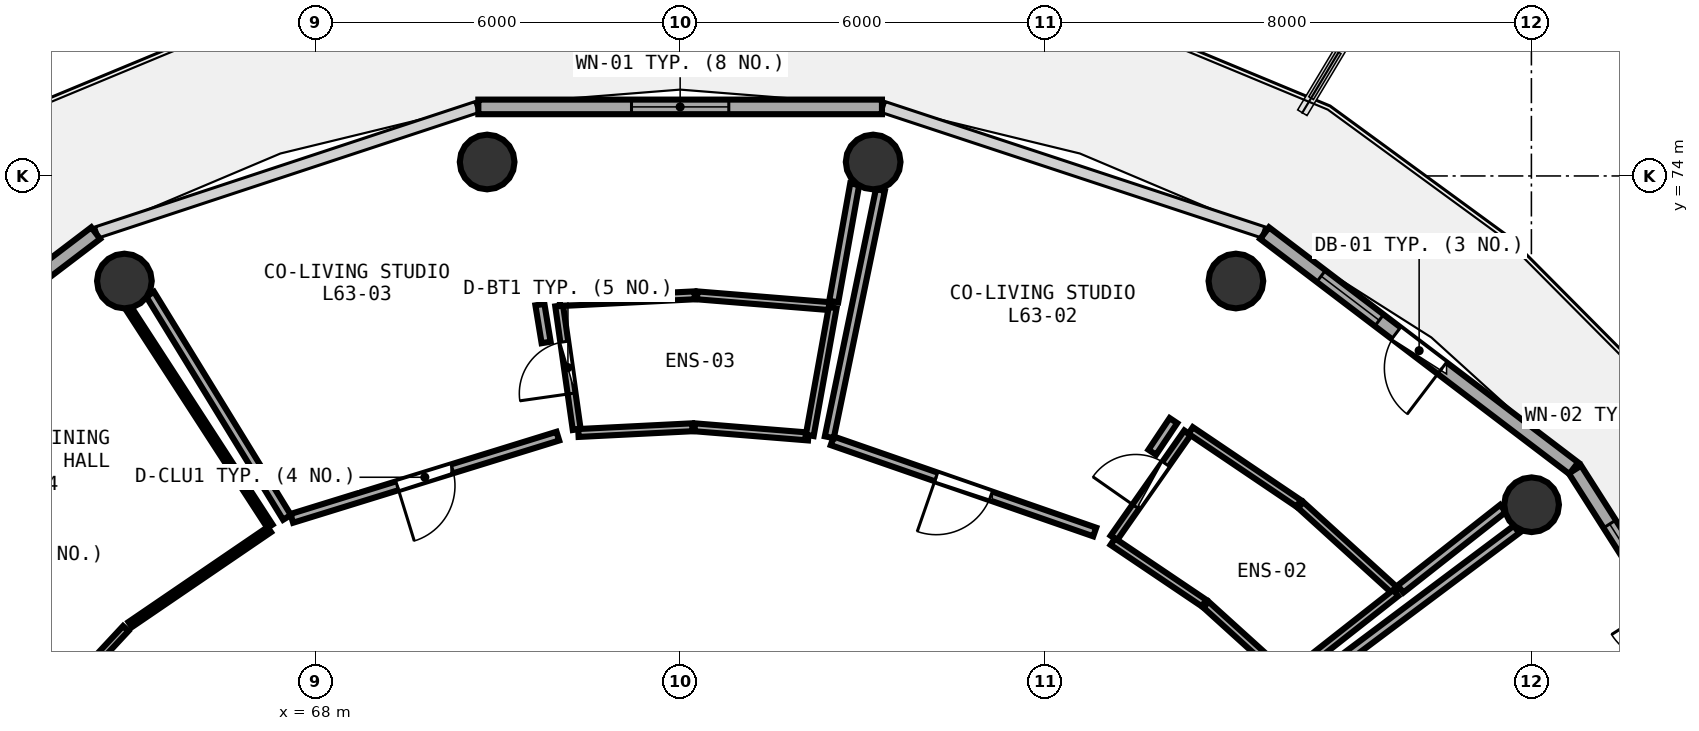
"""IFC4 building model, lengths in metres.
Left out: names, types, materials, properties, quantities, classifications, styles, units other than length and angle.
Written with IfcOpenShell. Run it as: python <this file> out.ifc"""

import sys

from ifc_helpers import new_model, si_unit, direction, frame, frame_2d, origin, origin_2d, place, context, subcontext, project, spatial, rectangle, circle, extrude, element, fill, save


model = new_model("IFC4")
c1 = context("Model", 3, precision=1e-05, world=origin(), true_north=direction((0.0, 1.0)))
c2 = subcontext(c1, "Body", "Model", "MODEL_VIEW")
j1 = project(units=[si_unit("LENGTHUNIT", "METRE"), si_unit("PLANEANGLEUNIT", "RADIAN")], contexts=[c1])
p1 = place(None, origin())
s1 = spatial("IfcSite", under=j1, at=p1, CompositionType="ELEMENT")
p2 = place(p1, origin())
s2 = spatial("IfcBuilding", under=s1, at=p2, CompositionType="ELEMENT")
p3 = place(p2, frame((0.0, 0.0, 248.7)))
s3 = spatial("IfcBuildingStorey", under=s2, at=p3, CompositionType="ELEMENT", Elevation=248.7)
for number, where, z_axis, x_axis in (
    (1, (88.003, 68.593, 0.0), (0.0, 0.0, 1.0), (1.0, 0.0, 0.0)),
    (2, (83.14, 72.272, 0.0), (0.0, 0.0, 1.0), (1.0, 0.0, 0.0)),
    (3, (77.174, 74.229, 0.0), (0.0, 0.0, 1.0), (1.0, 0.0, 0.0)),
    (4, (70.826, 74.229, 0.0), (0.0, 0.0, 1.0), (1.0, 0.0, 0.0)),
    (5, (64.86, 72.272, 0.0), (0.0, 0.0, 1.0), (1.0, 0.0, 0.0)),
):
    element("IfcColumn", number, at=place(p3, frame(where, z_axis=z_axis, x_axis=x_axis)), inside=s3, PredefinedType="COLUMN", context=c2, shape_type="SweptSolid", body=[
        extrude(circle(Radius=0.45, at=origin_2d()), origin(), (0.0, 0.0, 1.0), 3.75),
    ])
p4 = place(p3, frame((92.034, 63.964, 0.0), z_axis=(0.0, 0.0, 1.0), x_axis=(-0.537271968456, 0.843409053728, 0.0)))
e6 = element("IfcWall", 6, at=p4, inside=s3, PredefinedType="SOLIDWALL", context=c2, shape_type="SweptSolid", body=[
    extrude(rectangle(XDim=6.175, YDim=0.24, at=frame_2d((3.087, 0.0))), origin(), (0.0, 0.0, 1.0), 3.475),
])
p5 = place(p4, frame((2.613, 0.0, 0.0)))
e7 = element("IfcOpeningElement", 7, at=p5, cuts=e6, PredefinedType="OPENING", context=c2, shape_type="SweptSolid", body=[
    extrude(rectangle(XDim=0.95, YDim=2.1, at=frame_2d((0.475, 1.05))), frame((0.0, 0.13, 0.0), z_axis=(0.0, -1.0, 0.0), x_axis=(1.0, 0.0, 0.0)), (0.0, 0.0, 1.0), 0.26),
])
p6 = place(p4, frame((3.913, 0.0, 0.85)))
e8 = element("IfcOpeningElement", 8, at=p6, cuts=e6, PredefinedType="OPENING", context=c2, shape_type="SweptSolid", body=[
    extrude(rectangle(XDim=1.2, YDim=1.45, at=frame_2d((0.6, 0.725))), frame((0.0, 0.13, 0.0), z_axis=(0.0, -1.0, 0.0), x_axis=(1.0, 0.0, 0.0)), (0.0, 0.0, 1.0), 0.26),
])
p7 = place(p3, frame((88.696, 69.194, 0.0), z_axis=(0.0, 0.0, 1.0), x_axis=(-0.796010444211, 0.605282886514, 0.0)))
e9 = element("IfcWall", 9, at=p7, inside=s3, PredefinedType="SOLIDWALL", context=c2, shape_type="SweptSolid", body=[
    extrude(rectangle(XDim=6.387, YDim=0.24, at=frame_2d((3.194, 0.0))), origin(), (0.0, 0.0, 1.0), 3.475),
])
p8 = place(p7, frame((2.719, 0.0, 0.0)))
e10 = element("IfcOpeningElement", 10, at=p8, cuts=e9, PredefinedType="OPENING", context=c2, shape_type="SweptSolid", body=[
    extrude(rectangle(XDim=0.95, YDim=2.1, at=frame_2d((0.475, 1.05))), frame((0.0, 0.13, 0.0), z_axis=(0.0, -1.0, 0.0), x_axis=(1.0, 0.0, 0.0)), (0.0, 0.0, 1.0), 0.26),
])
p9 = place(p7, frame((4.019, 0.0, 0.85)))
e11 = element("IfcOpeningElement", 11, at=p9, cuts=e9, PredefinedType="OPENING", context=c2, shape_type="SweptSolid", body=[
    extrude(rectangle(XDim=1.2, YDim=1.45, at=frame_2d((0.6, 0.725))), frame((0.0, 0.13, 0.0), z_axis=(0.0, -1.0, 0.0), x_axis=(1.0, 0.0, 0.0)), (0.0, 0.0, 1.0), 0.26),
])
p10 = place(p3, frame((77.319, 75.136, 0.0), z_axis=(0.0, 0.0, 1.0), x_axis=(-1.0, 0.0, 0.0)))
e12 = element("IfcWall", 12, at=p10, inside=s3, PredefinedType="SOLIDWALL", context=c2, shape_type="SweptSolid", body=[
    extrude(rectangle(XDim=6.638, YDim=0.24, at=frame_2d((3.319, 0.0))), origin(), (0.0, 0.0, 1.0), 3.475),
])
p11 = place(p10, frame((2.519, 0.0, 0.85)))
e13 = element("IfcOpeningElement", 13, at=p11, cuts=e12, PredefinedType="OPENING", context=c2, shape_type="SweptSolid", body=[
    extrude(rectangle(XDim=1.6, YDim=1.45, at=frame_2d((0.8, 0.725))), frame((0.0, 0.13, 0.0), z_axis=(0.0, -1.0, 0.0), x_axis=(1.0, 0.0, 0.0)), (0.0, 0.0, 1.0), 0.26),
])
p12 = place(p3, frame((64.388, 73.06, 0.0), z_axis=(0.0, 0.0, 1.0), x_axis=(-0.796010444211, -0.605282886514, 0.0)))
e14 = element("IfcWall", 14, at=p12, inside=s3, PredefinedType="SOLIDWALL", context=c2, shape_type="SweptSolid", body=[
    extrude(rectangle(XDim=6.387, YDim=0.24, at=frame_2d((3.194, 0.0))), origin(), (0.0, 0.0, 1.0), 3.475),
])
p13 = place(p12, frame((2.394, 0.0, 0.85)))
e15 = element("IfcOpeningElement", 15, at=p13, cuts=e14, PredefinedType="OPENING", context=c2, shape_type="SweptSolid", body=[
    extrude(rectangle(XDim=1.6, YDim=1.45, at=frame_2d((0.8, 0.725))), frame((0.0, 0.13, 0.0), z_axis=(0.0, -1.0, 0.0), x_axis=(1.0, 0.0, 0.0)), (0.0, 0.0, 1.0), 0.26),
])
p14 = place(p3, frame((81.133, 68.047, 0.0), z_axis=(0.0, 0.0, 1.0), x_axis=(0.573578732096, 0.819150436787, 0.0)))
e16 = element("IfcWall", 16, at=p14, inside=s3, PredefinedType="PLUMBINGWALL", context=c2, shape_type="SweptSolid", body=[
    extrude(rectangle(XDim=2.112, YDim=0.13, at=frame_2d((1.056, 0.0))), origin(), (0.0, 0.0, 1.0), 3.175),
])
p15 = place(p14, frame((0.626, 0.0, 0.0)))
e17 = element("IfcOpeningElement", 17, at=p15, cuts=e16, PredefinedType="OPENING", context=c2, shape_type="SweptSolid", body=[
    extrude(rectangle(XDim=0.86, YDim=2.05, at=frame_2d((0.43, 1.025))), frame((0.0, 0.075, 0.0), z_axis=(0.0, -1.0, 0.0), x_axis=(1.0, 0.0, 0.0)), (0.0, 0.0, 1.0), 0.15),
])
p16 = place(p3, frame((80.818, 68.145, 0.0), z_axis=(0.0, 0.0, 1.0), x_axis=(-0.944627899296, 0.328143462331, 0.0)))
e18 = element("IfcWall", 18, at=p16, inside=s3, PredefinedType="PARTITIONING", context=c2, shape_type="SweptSolid", body=[
    extrude(rectangle(XDim=4.57, YDim=0.15, at=frame_2d((2.285, 0.0))), origin(), (0.0, 0.0, 1.0), 3.48),
])
p17 = place(p16, frame((1.81, 0.0, 0.0)))
e19 = element("IfcOpeningElement", 19, at=p17, cuts=e18, PredefinedType="OPENING", context=c2, shape_type="SweptSolid", body=[
    extrude(rectangle(XDim=0.95, YDim=2.08, at=frame_2d((0.475, 1.04))), frame((0.0, 0.085, 0.0), z_axis=(0.0, -1.0, 0.0), x_axis=(1.0, 0.0, 0.0)), (0.0, 0.0, 1.0), 0.17),
])
p18 = place(p3, frame((72.299, 69.831, 0.0), z_axis=(0.0, 0.0, 1.0), x_axis=(-0.14028943716, 0.990110536163, 0.0)))
e20 = element("IfcWall", 20, at=p18, inside=s3, PredefinedType="PLUMBINGWALL", context=c2, shape_type="SweptSolid", body=[
    extrude(rectangle(XDim=2.053, YDim=0.13, at=frame_2d((1.027, 0.0))), origin(), (0.0, 0.0, 1.0), 3.175),
])
p19 = place(p18, frame((0.597, 0.0, 0.0)))
e21 = element("IfcOpeningElement", 21, at=p19, cuts=e20, PredefinedType="OPENING", context=c2, shape_type="SweptSolid", body=[
    extrude(rectangle(XDim=0.86, YDim=2.05, at=frame_2d((0.43, 1.025))), frame((0.0, 0.075, 0.0), z_axis=(0.0, -1.0, 0.0), x_axis=(1.0, 0.0, 0.0)), (0.0, 0.0, 1.0), 0.15),
])
p20 = place(p3, frame((71.989, 69.721, 0.0), z_axis=(0.0, 0.0, 1.0), x_axis=(-0.955414123224, -0.295269119863, 0.0)))
e22 = element("IfcWall", 22, at=p20, inside=s3, PredefinedType="PARTITIONING", context=c2, shape_type="SweptSolid", body=[
    extrude(rectangle(XDim=4.581, YDim=0.15, at=frame_2d((2.291, 0.0))), origin(), (0.0, 0.0, 1.0), 3.075),
])
p21 = place(p20, frame((1.815, 0.0, 0.0)))
e23 = element("IfcOpeningElement", 23, at=p21, cuts=e22, PredefinedType="OPENING", context=c2, shape_type="SweptSolid", body=[
    extrude(rectangle(XDim=0.95, YDim=2.08, at=frame_2d((0.475, 1.04))), frame((0.0, 0.085, 0.0), z_axis=(0.0, -1.0, 0.0), x_axis=(1.0, 0.0, 0.0)), (0.0, 0.0, 1.0), 0.17),
])
p22 = place(p3, frame((64.882, 66.557, 0.0), z_axis=(0.0, 0.0, 1.0), x_axis=(-0.681315269885, -0.731990097625, 0.0)))
e24 = element("IfcWall", 24, at=p22, inside=s3, PredefinedType="PARTITIONING", context=c2, shape_type="SweptSolid", body=[
    extrude(rectangle(XDim=2.664, YDim=0.12, at=frame_2d((1.332, 0.0))), origin(), (0.0, 0.0, 1.0), 3.075),
])
p23 = place(p22, frame((0.882, 0.0, 0.0)))
e25 = element("IfcOpeningElement", 25, at=p23, cuts=e24, PredefinedType="OPENING", context=c2, shape_type="SweptSolid", body=[
    extrude(rectangle(XDim=0.9, YDim=2.08, at=frame_2d((0.45, 1.04))), frame((0.0, 0.07, 0.0), z_axis=(0.0, -1.0, 0.0), x_axis=(1.0, 0.0, 0.0)), (0.0, 0.0, 1.0), 0.14),
])
p24 = place(p3, frame((84.223, 65.542, 0.0), z_axis=(0.0, 0.0, 1.0), x_axis=(0.800384816546, 0.599486568191, 0.0)))
e26 = element("IfcWall", 26, at=p24, inside=s3, PredefinedType="PARTITIONING", context=c2, shape_type="SweptSolid", body=[
    extrude(rectangle(XDim=4.414, YDim=0.15, at=frame_2d((2.207, 0.0))), origin(), (0.0, 0.0, 1.0), 3.175),
])
p25 = place(p3, frame((83.97, 65.753, 0.0), z_axis=(0.0, 0.0, 1.0), x_axis=(-0.741337974143, 0.671131885767, 0.0)))
e27 = element("IfcWall", 27, at=p25, inside=s3, PredefinedType="PLUMBINGWALL", context=c2, shape_type="SweptSolid", body=[
    extrude(rectangle(XDim=1.784, YDim=0.13, at=frame_2d((0.892, 0.0))), origin(), (0.0, 0.0, 1.0), 3.075),
])
p26 = place(p3, frame((82.616, 66.975, 0.0), z_axis=(0.0, 0.0, 1.0), x_axis=(-0.82921750612, 0.558926048367, 0.0)))
e28 = element("IfcWall", 28, at=p26, inside=s3, PredefinedType="PLUMBINGWALL", context=c2, shape_type="SweptSolid", body=[
    extrude(rectangle(XDim=1.81, YDim=0.13, at=frame_2d((0.905, 0.0))), origin(), (0.0, 0.0, 1.0), 3.075),
])
p27 = place(p3, frame((82.396, 69.815, 0.0), z_axis=(0.0, 0.0, 1.0), x_axis=(0.828761584291, -0.559601855254, 0.0)))
e29 = element("IfcWall", 29, at=p27, inside=s3, PredefinedType="PLUMBINGWALL", context=c2, shape_type="SweptSolid", body=[
    extrude(rectangle(XDim=2.145, YDim=0.13, at=frame_2d((1.073, 0.0))), origin(), (0.0, 0.0, 1.0), 3.075),
])
p28 = place(p3, frame((84.205, 68.59, 0.0), z_axis=(0.0, 0.0, 1.0), x_axis=(0.740404918602, -0.672161109043, 0.0)))
e30 = element("IfcWall", 30, at=p28, inside=s3, PredefinedType="PLUMBINGWALL", context=c2, shape_type="SweptSolid", body=[
    extrude(rectangle(XDim=2.114, YDim=0.13, at=frame_2d((1.057, 0.0))), origin(), (0.0, 0.0, 1.0), 3.075),
])
p29 = place(p3, frame((85.769, 67.143, 0.0), z_axis=(0.0, 0.0, 1.0), x_axis=(-0.786197810061, -0.617974921381, 0.0)))
e31 = element("IfcWall", 31, at=p29, inside=s3, PredefinedType="PLUMBINGWALL", context=c2, shape_type="SweptSolid", body=[
    extrude(rectangle(XDim=2.25, YDim=0.13, at=frame_2d((1.125, 0.0))), origin(), (0.0, 0.0, 1.0), 3.075),
])
p30 = place(p3, frame((76.453, 69.703, 0.0), z_axis=(0.0, 0.0, 1.0), x_axis=(0.202308141573, 0.979321916355, 0.0)))
e32 = element("IfcWall", 32, at=p30, inside=s3, PredefinedType="PARTITIONING", context=c2, shape_type="SweptSolid", body=[
    extrude(rectangle(XDim=4.153, YDim=0.15, at=frame_2d((2.076, 0.0))), origin(), (0.0, 0.0, 1.0), 3.175),
])
p31 = place(p3, frame((87.532, 68.533, 0.0), z_axis=(0.0, 0.0, 1.0), x_axis=(-0.785832073147, -0.618439934685, 0.0)))
e33 = element("IfcWall", 33, at=p31, inside=s3, PredefinedType="PARTITIONING", context=c2, shape_type="SweptSolid", body=[
    extrude(rectangle(XDim=2.144, YDim=0.15, at=frame_2d((1.072, 0.0))), origin(), (0.0, 0.0, 1.0), 3.075),
])
p32 = place(p3, frame((82.113, 69.977, 0.0), z_axis=(0.0, 0.0, 1.0), x_axis=(-0.555598996852, -0.831450392204, 0.0)))
e34 = element("IfcWall", 34, at=p32, inside=s3, PredefinedType="PARTITIONING", context=c2, shape_type="SweptSolid", body=[
    extrude(rectangle(XDim=0.627, YDim=0.15, at=frame_2d((0.313, 0.0))), origin(), (0.0, 0.0, 1.0), 3.175),
])
p33 = place(p3, frame((76.108, 69.716, 0.0), z_axis=(0.0, 0.0, 1.0), x_axis=(-0.996754521178, 0.080501083911, 0.0)))
e35 = element("IfcWall", 35, at=p33, inside=s3, PredefinedType="PLUMBINGWALL", context=c2, shape_type="SweptSolid", body=[
    extrude(rectangle(XDim=1.874, YDim=0.13, at=frame_2d((0.937, 0.0))), origin(), (0.0, 0.0, 1.0), 3.075),
])
p34 = place(p3, frame((74.2, 69.867, 0.0), z_axis=(0.0, 0.0, 1.0), x_axis=(-0.998743232436, -0.050119414036, 0.0)))
e36 = element("IfcWall", 36, at=p34, inside=s3, PredefinedType="PLUMBINGWALL", context=c2, shape_type="SweptSolid", body=[
    extrude(rectangle(XDim=1.875, YDim=0.13, at=frame_2d((0.938, 0.0))), origin(), (0.0, 0.0, 1.0), 3.48),
])
p35 = place(p3, frame((72.022, 71.925, 0.0), z_axis=(0.0, 0.0, 1.0), x_axis=(0.998726159472, 0.050458481805, 0.0)))
e37 = element("IfcWall", 37, at=p35, inside=s3, PredefinedType="PLUMBINGWALL", context=c2, shape_type="SweptSolid", body=[
    extrude(rectangle(XDim=2.221, YDim=0.13, at=frame_2d((1.11, 0.0))), origin(), (0.0, 0.0, 1.0), 3.48),
])
p36 = place(p3, frame((74.28, 72.036, 0.0), z_axis=(0.0, 0.0, 1.0), x_axis=(0.996718024019, -0.080951717687, 0.0)))
e38 = element("IfcWall", 38, at=p36, inside=s3, PredefinedType="PLUMBINGWALL", context=c2, shape_type="SweptSolid", body=[
    extrude(rectangle(XDim=2.22, YDim=0.13, at=frame_2d((1.11, 0.0))), origin(), (0.0, 0.0, 1.0), 3.075),
])
p37 = place(p3, frame((76.509, 71.835, 0.0), z_axis=(0.0, 0.0, 1.0), x_axis=(-0.176550443794, -0.984291593379, 0.0)))
e39 = element("IfcWall", 39, at=p37, inside=s3, PredefinedType="PLUMBINGWALL", context=c2, shape_type="SweptSolid", body=[
    extrude(rectangle(XDim=2.135, YDim=0.13, at=frame_2d((1.067, 0.0))), origin(), (0.0, 0.0, 1.0), 3.075),
])
p38 = place(p3, frame((67.534, 68.385, 0.0), z_axis=(0.0, 0.0, 1.0), x_axis=(-0.522784059663, 0.852465147066, 0.0)))
e40 = element("IfcWall", 40, at=p38, inside=s3, PredefinedType="PARTITIONING", context=c2, shape_type="SweptSolid", body=[
    extrude(rectangle(XDim=4.306, YDim=0.15, at=frame_2d((2.153, 0.0))), origin(), (0.0, 0.0, 1.0), 3.175),
])
p39 = place(p3, frame((76.871, 73.864, 0.0), z_axis=(0.0, 0.0, 1.0), x_axis=(-0.176100981623, -0.98437210661, 0.0)))
e41 = element("IfcWall", 41, at=p39, inside=s3, PredefinedType="PARTITIONING", context=c2, shape_type="SweptSolid", body=[
    extrude(rectangle(XDim=1.96, YDim=0.15, at=frame_2d((0.98, 0.0))), origin(), (0.0, 0.0, 1.0), 3.075),
])
p40 = place(p3, frame((71.694, 71.885, 0.0), z_axis=(0.0, 0.0, 1.0), x_axis=(0.162139500997, -0.986767846161, 0.0)))
e42 = element("IfcWall", 42, at=p40, inside=s3, PredefinedType="PARTITIONING", context=c2, shape_type="SweptSolid", body=[
    extrude(rectangle(XDim=0.631, YDim=0.15, at=frame_2d((0.315, 0.0))), origin(), (0.0, 0.0, 1.0), 3.48),
])
p41 = place(p3, frame((67.243, 68.184, 0.0), z_axis=(0.0, 0.0, 1.0), x_axis=(-0.826087380575, -0.563542047814, 0.0)))
e43 = element("IfcWall", 43, at=p41, inside=s3, PredefinedType="PARTITIONING", context=c2, shape_type="SweptSolid", body=[
    extrude(rectangle(XDim=2.768, YDim=0.1, at=frame_2d((1.384, 0.0))), origin(), (0.0, 0.0, 1.0), 3.075),
])
p42 = place(p3, frame((64.942, 71.804, 0.0), z_axis=(0.0, 0.0, 1.0), x_axis=(0.544234825024, -0.838932926539, 0.0)))
e44 = element("IfcWall", 44, at=p42, inside=s3, PredefinedType="PARTITIONING", context=c2, shape_type="SweptSolid", body=[
    extrude(rectangle(XDim=4.249, YDim=0.1, at=frame_2d((2.125, 0.0))), origin(), (0.0, 0.0, 1.0), 3.075),
])
p43 = place(p6, origin())
e45 = element("IfcWindow", 45, at=p43, inside=s3, PartitioningType="SINGLE_PANEL", PredefinedType="WINDOW", context=c2, shape_type="SweptSolid", body=[
    extrude(rectangle(XDim=1.2, YDim=1.45, at=frame_2d((0.6, 0.725))), frame((0.0, 0.03, 0.0), z_axis=(0.0, -1.0, 0.0), x_axis=(1.0, 0.0, 0.0)), (0.0, 0.0, 1.0), 0.06),
])
fill(e8, e45)
p44 = place(p8, frame((0.95, 0.0, 0.0), z_axis=(0.0, 0.0, 1.0), x_axis=(-1.0, 0.0, 0.0)))
e46 = element("IfcDoor", 46, at=p44, inside=s3, OperationType="SINGLE_SWING_RIGHT", PredefinedType="DOOR", context=c2, shape_type="SweptSolid", body=[
    extrude(rectangle(XDim=0.95, YDim=2.1, at=frame_2d((0.475, 1.05))), frame((0.0, 0.025, 0.0), z_axis=(0.0, -1.0, 0.0), x_axis=(1.0, 0.0, 0.0)), (0.0, 0.0, 1.0), 0.05),
])
fill(e10, e46)
p45 = place(p9, origin())
e47 = element("IfcWindow", 47, at=p45, inside=s3, PartitioningType="SINGLE_PANEL", PredefinedType="WINDOW", context=c2, shape_type="SweptSolid", body=[
    extrude(rectangle(XDim=1.2, YDim=1.45, at=frame_2d((0.6, 0.725))), frame((0.0, 0.03, 0.0), z_axis=(0.0, -1.0, 0.0), x_axis=(1.0, 0.0, 0.0)), (0.0, 0.0, 1.0), 0.06),
])
fill(e11, e47)
p46 = place(p11, origin())
e48 = element("IfcWindow", 48, at=p46, inside=s3, PartitioningType="SINGLE_PANEL", PredefinedType="WINDOW", context=c2, shape_type="SweptSolid", body=[
    extrude(rectangle(XDim=1.6, YDim=1.45, at=frame_2d((0.8, 0.725))), frame((0.0, 0.03, 0.0), z_axis=(0.0, -1.0, 0.0), x_axis=(1.0, 0.0, 0.0)), (0.0, 0.0, 1.0), 0.06),
])
fill(e13, e48)
p47 = place(p15, origin())
e49 = element("IfcDoor", 49, at=p47, inside=s3, OperationType="SINGLE_SWING_LEFT", PredefinedType="DOOR", context=c2, shape_type="SweptSolid", body=[
    extrude(rectangle(XDim=0.86, YDim=2.05, at=frame_2d((0.43, 1.025))), frame((0.0, 0.025, 0.0), z_axis=(0.0, -1.0, 0.0), x_axis=(1.0, 0.0, 0.0)), (0.0, 0.0, 1.0), 0.05),
])
fill(e17, e49)
p48 = place(p17, origin())
e50 = element("IfcDoor", 50, at=p48, inside=s3, OperationType="SINGLE_SWING_RIGHT", PredefinedType="DOOR", context=c2, shape_type="SweptSolid", body=[
    extrude(rectangle(XDim=0.95, YDim=2.08, at=frame_2d((0.475, 1.04))), frame((0.0, 0.025, 0.0), z_axis=(0.0, -1.0, 0.0), x_axis=(1.0, 0.0, 0.0)), (0.0, 0.0, 1.0), 0.05),
])
fill(e19, e50)
p49 = place(p19, origin())
e51 = element("IfcDoor", 51, at=p49, inside=s3, OperationType="SINGLE_SWING_LEFT", PredefinedType="DOOR", context=c2, shape_type="SweptSolid", body=[
    extrude(rectangle(XDim=0.86, YDim=2.05, at=frame_2d((0.43, 1.025))), frame((0.0, 0.025, 0.0), z_axis=(0.0, -1.0, 0.0), x_axis=(1.0, 0.0, 0.0)), (0.0, 0.0, 1.0), 0.05),
])
fill(e21, e51)
p50 = place(p21, origin())
e52 = element("IfcDoor", 52, at=p50, inside=s3, OperationType="SINGLE_SWING_RIGHT", PredefinedType="DOOR", context=c2, shape_type="SweptSolid", body=[
    extrude(rectangle(XDim=0.95, YDim=2.08, at=frame_2d((0.475, 1.04))), frame((0.0, 0.025, 0.0), z_axis=(0.0, -1.0, 0.0), x_axis=(1.0, 0.0, 0.0)), (0.0, 0.0, 1.0), 0.05),
])
fill(e23, e52)
save(model, sys.argv[1])
